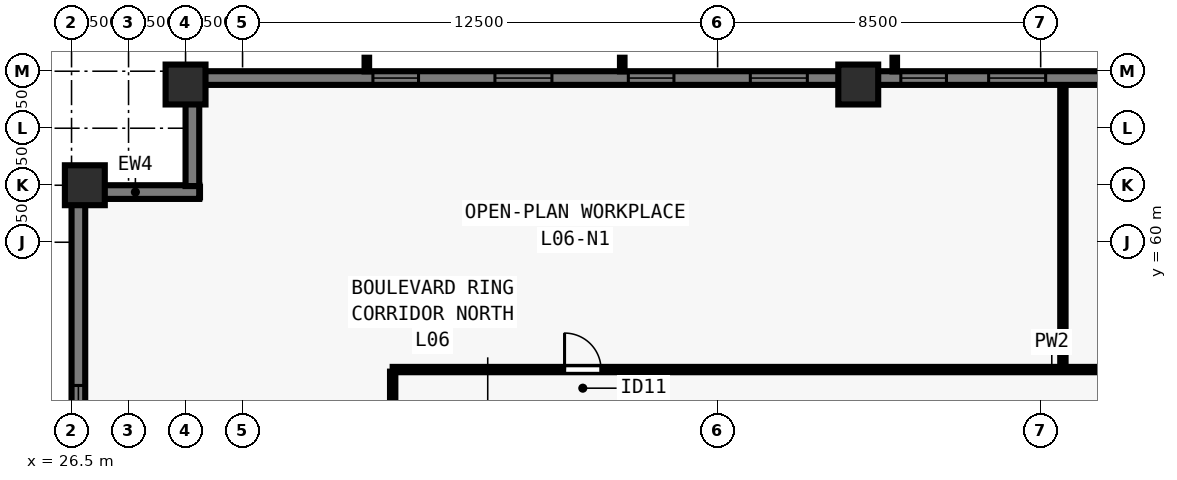
"""IFC4 building model, lengths in metres.
Left out: names, types, materials, properties, quantities, classifications, styles, units other than length and angle.
Written with IfcOpenShell. Run it as: python <this file> out.ifc"""

import sys

from ifc_helpers import new_model, si_unit, direction, frame, frame_2d, origin, origin_2d, place, context, subcontext, project, spatial, rectangle, extrude, element, fill, save


model = new_model("IFC4")
c1 = context("Model", 3, precision=1e-05, world=origin(), true_north=direction((0.0, 1.0)))
c2 = subcontext(c1, "Body", "Model", "MODEL_VIEW")
j1 = project(units=[si_unit("LENGTHUNIT", "METRE"), si_unit("PLANEANGLEUNIT", "RADIAN")], contexts=[c1])
p1 = place(None, origin())
s1 = spatial("IfcSite", under=j1, at=p1, CompositionType="ELEMENT")
p2 = place(p1, origin())
s2 = spatial("IfcBuilding", under=s1, at=p2, CompositionType="ELEMENT")
p3 = place(p2, frame((0.0, 0.0, 27.0)))
s3 = spatial("IfcBuildingStorey", under=s2, at=p3, CompositionType="ELEMENT", Elevation=27.0)
for number, where, z_axis, x_axis in (
    (1, (47.2, 64.15, 0.0), (0.0, 0.0, 1.0), (1.0, 0.0, 0.0)),
    (2, (29.5, 64.15, 0.0), (0.0, 0.0, 1.0), (1.0, 0.0, 0.0)),
    (3, (26.85, 61.5, 0.0), (0.0, 0.0, 1.0), (0.0, 1.0, 0.0)),
):
    element("IfcColumn", number, at=place(p3, frame(where, z_axis=z_axis, x_axis=x_axis)), inside=s3, PredefinedType="COLUMN", context=c2, shape_type="SweptSolid", body=[
        extrude(rectangle(XDim=1.05, YDim=1.05, at=origin_2d()), origin(), (0.0, 0.0, 1.0), 3.5),
    ])
p4 = place(p3, frame((26.68, 16.5, 0.0), z_axis=(0.0, 0.0, 1.0), x_axis=(0.0, 1.0, 0.0)))
e4 = element("IfcWall", 4, at=p4, inside=s3, PredefinedType="SOLIDWALL", context=c2, shape_type="SweptSolid", body=[
    extrude(rectangle(XDim=44.662, YDim=0.36, at=frame_2d((22.331, 0.0))), origin(), (0.0, 0.0, 1.0), 3.28),
])
p5 = place(p4, frame((4.93, 0.0, 0.8)))
e5 = element("IfcOpeningElement", 5, at=p5, cuts=e4, PredefinedType="OPENING", context=c2, shape_type="SweptSolid", body=[
    extrude(rectangle(XDim=1.2, YDim=1.544, at=frame_2d((0.6, 0.772))), frame((0.0, 0.19, 0.0), z_axis=(0.0, -1.0, 0.0), x_axis=(1.0, 0.0, 0.0)), (0.0, 0.0, 1.0), 0.38),
])
p6 = place(p4, frame((8.14, 0.0, 0.8)))
e6 = element("IfcOpeningElement", 6, at=p6, cuts=e4, PredefinedType="OPENING", context=c2, shape_type="SweptSolid", body=[
    extrude(rectangle(XDim=1.5, YDim=1.544, at=frame_2d((0.75, 0.772))), frame((0.0, 0.19, 0.0), z_axis=(0.0, -1.0, 0.0), x_axis=(1.0, 0.0, 0.0)), (0.0, 0.0, 1.0), 0.38),
])
p7 = place(p4, frame((11.65, 0.0, 0.8)))
e7 = element("IfcOpeningElement", 7, at=p7, cuts=e4, PredefinedType="OPENING", context=c2, shape_type="SweptSolid", body=[
    extrude(rectangle(XDim=1.2, YDim=1.544, at=frame_2d((0.6, 0.772))), frame((0.0, 0.19, 0.0), z_axis=(0.0, -1.0, 0.0), x_axis=(1.0, 0.0, 0.0)), (0.0, 0.0, 1.0), 0.38),
])
p8 = place(p4, frame((14.411, 0.0, 0.8)))
e8 = element("IfcOpeningElement", 8, at=p8, cuts=e4, PredefinedType="OPENING", context=c2, shape_type="SweptSolid", body=[
    extrude(rectangle(XDim=1.5, YDim=1.544, at=frame_2d((0.75, 0.772))), frame((0.0, 0.19, 0.0), z_axis=(0.0, -1.0, 0.0), x_axis=(1.0, 0.0, 0.0)), (0.0, 0.0, 1.0), 0.38),
])
p9 = place(p4, frame((18.821, 0.0, 0.8)))
e9 = element("IfcOpeningElement", 9, at=p9, cuts=e4, PredefinedType="OPENING", context=c2, shape_type="SweptSolid", body=[
    extrude(rectangle(XDim=1.2, YDim=1.544, at=frame_2d((0.6, 0.772))), frame((0.0, 0.19, 0.0), z_axis=(0.0, -1.0, 0.0), x_axis=(1.0, 0.0, 0.0)), (0.0, 0.0, 1.0), 0.38),
])
p10 = place(p4, frame((21.581, 0.0, 0.8)))
e10 = element("IfcOpeningElement", 10, at=p10, cuts=e4, PredefinedType="OPENING", context=c2, shape_type="SweptSolid", body=[
    extrude(rectangle(XDim=1.5, YDim=1.544, at=frame_2d((0.75, 0.772))), frame((0.0, 0.19, 0.0), z_axis=(0.0, -1.0, 0.0), x_axis=(1.0, 0.0, 0.0)), (0.0, 0.0, 1.0), 0.38),
])
p11 = place(p4, frame((25.091, 0.0, 0.8)))
e11 = element("IfcOpeningElement", 11, at=p11, cuts=e4, PredefinedType="OPENING", context=c2, shape_type="SweptSolid", body=[
    extrude(rectangle(XDim=1.2, YDim=1.544, at=frame_2d((0.6, 0.772))), frame((0.0, 0.19, 0.0), z_axis=(0.0, -1.0, 0.0), x_axis=(1.0, 0.0, 0.0)), (0.0, 0.0, 1.0), 0.38),
])
p12 = place(p4, frame((29.151, 0.0, 0.8)))
e12 = element("IfcOpeningElement", 12, at=p12, cuts=e4, PredefinedType="OPENING", context=c2, shape_type="SweptSolid", body=[
    extrude(rectangle(XDim=1.5, YDim=1.544, at=frame_2d((0.75, 0.772))), frame((0.0, 0.19, 0.0), z_axis=(0.0, -1.0, 0.0), x_axis=(1.0, 0.0, 0.0)), (0.0, 0.0, 1.0), 0.38),
])
p13 = place(p4, frame((31.812, 0.0, 0.8)))
e13 = element("IfcOpeningElement", 13, at=p13, cuts=e4, PredefinedType="OPENING", context=c2, shape_type="SweptSolid", body=[
    extrude(rectangle(XDim=1.2, YDim=1.544, at=frame_2d((0.6, 0.772))), frame((0.0, 0.19, 0.0), z_axis=(0.0, -1.0, 0.0), x_axis=(1.0, 0.0, 0.0)), (0.0, 0.0, 1.0), 0.38),
])
p14 = place(p4, frame((35.022, 0.0, 0.8)))
e14 = element("IfcOpeningElement", 14, at=p14, cuts=e4, PredefinedType="OPENING", context=c2, shape_type="SweptSolid", body=[
    extrude(rectangle(XDim=1.5, YDim=1.544, at=frame_2d((0.75, 0.772))), frame((0.0, 0.19, 0.0), z_axis=(0.0, -1.0, 0.0), x_axis=(1.0, 0.0, 0.0)), (0.0, 0.0, 1.0), 0.38),
])
p15 = place(p4, frame((38.532, 0.0, 0.8)))
e15 = element("IfcOpeningElement", 15, at=p15, cuts=e4, PredefinedType="OPENING", context=c2, shape_type="SweptSolid", body=[
    extrude(rectangle(XDim=1.2, YDim=1.544, at=frame_2d((0.6, 0.772))), frame((0.0, 0.19, 0.0), z_axis=(0.0, -1.0, 0.0), x_axis=(1.0, 0.0, 0.0)), (0.0, 0.0, 1.0), 0.38),
])
p16 = place(p3, frame((26.5, 61.32, 0.0), z_axis=(0.0, 0.0, 1.0), x_axis=(1.0, 0.0, 0.0)))
e16 = element("IfcWall", 16, at=p16, inside=s3, PredefinedType="SOLIDWALL", context=c2, shape_type="SweptSolid", body=[
    extrude(rectangle(XDim=3.36, YDim=0.36, at=frame_2d((1.68, 0.0))), origin(), (0.0, 0.0, 1.0), 3.28),
])
p17 = place(p3, frame((29.68, 61.478, 0.0), z_axis=(0.0, 0.0, 1.0), x_axis=(0.0, 1.0, 0.0)))
e17 = element("IfcWall", 17, at=p17, inside=s3, PredefinedType="SOLIDWALL", context=c2, shape_type="SweptSolid", body=[
    extrude(rectangle(XDim=2.684, YDim=0.36, at=frame_2d((1.342, 0.0))), origin(), (0.0, 0.0, 1.0), 3.28),
])
p18 = place(p3, frame((29.5, 64.32, 0.0), z_axis=(0.0, 0.0, 1.0), x_axis=(1.0, 0.0, 0.0)))
e18 = element("IfcWall", 18, at=p18, inside=s3, PredefinedType="SOLIDWALL", context=c2, shape_type="SweptSolid", body=[
    extrude(rectangle(XDim=44.662, YDim=0.36, at=frame_2d((22.331, 0.0))), origin(), (0.0, 0.0, 1.0), 3.28),
])
p19 = place(p18, frame((4.93, 0.0, 0.8)))
e19 = element("IfcOpeningElement", 19, at=p19, cuts=e18, PredefinedType="OPENING", context=c2, shape_type="SweptSolid", body=[
    extrude(rectangle(XDim=1.2, YDim=1.544, at=frame_2d((0.6, 0.772))), frame((0.0, 0.19, 0.0), z_axis=(0.0, -1.0, 0.0), x_axis=(1.0, 0.0, 0.0)), (0.0, 0.0, 1.0), 0.38),
])
p20 = place(p18, frame((8.14, 0.0, 0.8)))
e20 = element("IfcOpeningElement", 20, at=p20, cuts=e18, PredefinedType="OPENING", context=c2, shape_type="SweptSolid", body=[
    extrude(rectangle(XDim=1.5, YDim=1.544, at=frame_2d((0.75, 0.772))), frame((0.0, 0.19, 0.0), z_axis=(0.0, -1.0, 0.0), x_axis=(1.0, 0.0, 0.0)), (0.0, 0.0, 1.0), 0.38),
])
p21 = place(p18, frame((11.65, 0.0, 0.8)))
e21 = element("IfcOpeningElement", 21, at=p21, cuts=e18, PredefinedType="OPENING", context=c2, shape_type="SweptSolid", body=[
    extrude(rectangle(XDim=1.2, YDim=1.544, at=frame_2d((0.6, 0.772))), frame((0.0, 0.19, 0.0), z_axis=(0.0, -1.0, 0.0), x_axis=(1.0, 0.0, 0.0)), (0.0, 0.0, 1.0), 0.38),
])
p22 = place(p18, frame((14.861, 0.0, 0.8)))
e22 = element("IfcOpeningElement", 22, at=p22, cuts=e18, PredefinedType="OPENING", context=c2, shape_type="SweptSolid", body=[
    extrude(rectangle(XDim=1.5, YDim=1.544, at=frame_2d((0.75, 0.772))), frame((0.0, 0.19, 0.0), z_axis=(0.0, -1.0, 0.0), x_axis=(1.0, 0.0, 0.0)), (0.0, 0.0, 1.0), 0.38),
])
p23 = place(p18, frame((18.821, 0.0, 0.8)))
e23 = element("IfcOpeningElement", 23, at=p23, cuts=e18, PredefinedType="OPENING", context=c2, shape_type="SweptSolid", body=[
    extrude(rectangle(XDim=1.2, YDim=1.544, at=frame_2d((0.6, 0.772))), frame((0.0, 0.19, 0.0), z_axis=(0.0, -1.0, 0.0), x_axis=(1.0, 0.0, 0.0)), (0.0, 0.0, 1.0), 0.38),
])
p24 = place(p18, frame((21.131, 0.0, 0.8)))
e24 = element("IfcOpeningElement", 24, at=p24, cuts=e18, PredefinedType="OPENING", context=c2, shape_type="SweptSolid", body=[
    extrude(rectangle(XDim=1.5, YDim=1.544, at=frame_2d((0.75, 0.772))), frame((0.0, 0.19, 0.0), z_axis=(0.0, -1.0, 0.0), x_axis=(1.0, 0.0, 0.0)), (0.0, 0.0, 1.0), 0.38),
])
p25 = place(p18, frame((25.091, 0.0, 0.8)))
e25 = element("IfcOpeningElement", 25, at=p25, cuts=e18, PredefinedType="OPENING", context=c2, shape_type="SweptSolid", body=[
    extrude(rectangle(XDim=1.2, YDim=1.544, at=frame_2d((0.6, 0.772))), frame((0.0, 0.19, 0.0), z_axis=(0.0, -1.0, 0.0), x_axis=(1.0, 0.0, 0.0)), (0.0, 0.0, 1.0), 0.38),
])
p26 = place(p18, frame((28.302, 0.0, 0.8)))
e26 = element("IfcOpeningElement", 26, at=p26, cuts=e18, PredefinedType="OPENING", context=c2, shape_type="SweptSolid", body=[
    extrude(rectangle(XDim=1.5, YDim=1.544, at=frame_2d((0.75, 0.772))), frame((0.0, 0.19, 0.0), z_axis=(0.0, -1.0, 0.0), x_axis=(1.0, 0.0, 0.0)), (0.0, 0.0, 1.0), 0.38),
])
p27 = place(p18, frame((31.812, 0.0, 0.8)))
e27 = element("IfcOpeningElement", 27, at=p27, cuts=e18, PredefinedType="OPENING", context=c2, shape_type="SweptSolid", body=[
    extrude(rectangle(XDim=1.2, YDim=1.544, at=frame_2d((0.6, 0.772))), frame((0.0, 0.19, 0.0), z_axis=(0.0, -1.0, 0.0), x_axis=(1.0, 0.0, 0.0)), (0.0, 0.0, 1.0), 0.38),
])
p28 = place(p18, frame((35.022, 0.0, 0.8)))
e28 = element("IfcOpeningElement", 28, at=p28, cuts=e18, PredefinedType="OPENING", context=c2, shape_type="SweptSolid", body=[
    extrude(rectangle(XDim=1.5, YDim=1.544, at=frame_2d((0.75, 0.772))), frame((0.0, 0.19, 0.0), z_axis=(0.0, -1.0, 0.0), x_axis=(1.0, 0.0, 0.0)), (0.0, 0.0, 1.0), 0.38),
])
p29 = place(p18, frame((38.532, 0.0, 0.8)))
e29 = element("IfcOpeningElement", 29, at=p29, cuts=e18, PredefinedType="OPENING", context=c2, shape_type="SweptSolid", body=[
    extrude(rectangle(XDim=1.2, YDim=1.544, at=frame_2d((0.6, 0.772))), frame((0.0, 0.19, 0.0), z_axis=(0.0, -1.0, 0.0), x_axis=(1.0, 0.0, 0.0)), (0.0, 0.0, 1.0), 0.38),
])
p30 = place(p3, frame((34.95, 56.65, 0.0), z_axis=(0.0, 0.0, 1.0), x_axis=(1.0, 0.0, 0.0)))
e30 = element("IfcWall", 30, at=p30, inside=s3, PredefinedType="PARTITIONING", context=c2, shape_type="SweptSolid", body=[
    extrude(rectangle(XDim=34.1, YDim=0.14, at=frame_2d((17.05, 0.0))), origin(), (0.0, 0.0, 1.0), 3.28),
])
p31 = place(p30, frame((4.522, 0.0, 0.0)))
e31 = element("IfcOpeningElement", 31, at=p31, cuts=e30, PredefinedType="OPENING", context=c2, shape_type="SweptSolid", body=[
    extrude(rectangle(XDim=0.96, YDim=2.12, at=frame_2d((0.48, 1.06))), frame((0.0, 0.08, 0.0), z_axis=(0.0, -1.0, 0.0), x_axis=(1.0, 0.0, 0.0)), (0.0, 0.0, 1.0), 0.16),
])
p32 = place(p30, frame((29.202, 0.0, 0.0)))
e32 = element("IfcOpeningElement", 32, at=p32, cuts=e30, PredefinedType="OPENING", context=c2, shape_type="SweptSolid", body=[
    extrude(rectangle(XDim=0.96, YDim=2.12, at=frame_2d((0.48, 1.06))), frame((0.0, 0.08, 0.0), z_axis=(0.0, -1.0, 0.0), x_axis=(1.0, 0.0, 0.0)), (0.0, 0.0, 1.0), 0.16),
])
p33 = place(p3, frame((34.95, 21.405, 0.0), z_axis=(0.0, 0.0, 1.0), x_axis=(0.0, 1.0, 0.0)))
e33 = element("IfcWall", 33, at=p33, inside=s3, PredefinedType="PARTITIONING", context=c2, shape_type="SweptSolid", body=[
    extrude(rectangle(XDim=35.19, YDim=0.14, at=frame_2d((17.595, 0.0))), origin(), (0.0, 0.0, 1.0), 3.28),
])
p34 = place(p33, frame((5.21, 0.0, 0.0)))
e34 = element("IfcOpeningElement", 34, at=p34, cuts=e33, PredefinedType="OPENING", context=c2, shape_type="SweptSolid", body=[
    extrude(rectangle(XDim=0.96, YDim=2.12, at=frame_2d((0.48, 1.06))), frame((0.0, 0.08, 0.0), z_axis=(0.0, -1.0, 0.0), x_axis=(1.0, 0.0, 0.0)), (0.0, 0.0, 1.0), 0.16),
])
p35 = place(p33, frame((17.052, 0.0, 0.0)))
e35 = element("IfcOpeningElement", 35, at=p35, cuts=e33, PredefinedType="OPENING", context=c2, shape_type="SweptSolid", body=[
    extrude(rectangle(XDim=0.96, YDim=2.12, at=frame_2d((0.48, 1.06))), frame((0.0, 0.08, 0.0), z_axis=(0.0, -1.0, 0.0), x_axis=(1.0, 0.0, 0.0)), (0.0, 0.0, 1.0), 0.16),
])
p36 = place(p33, frame((28.957, 0.0, 0.0)))
e36 = element("IfcOpeningElement", 36, at=p36, cuts=e33, PredefinedType="OPENING", context=c2, shape_type="SweptSolid", body=[
    extrude(rectangle(XDim=0.96, YDim=2.12, at=frame_2d((0.48, 1.06))), frame((0.0, 0.08, 0.0), z_axis=(0.0, -1.0, 0.0), x_axis=(1.0, 0.0, 0.0)), (0.0, 0.0, 1.0), 0.16),
])
p37 = place(p3, frame((52.585, 56.75, 0.0), z_axis=(0.0, 0.0, 1.0), x_axis=(0.0, 1.0, 0.0)))
e37 = element("IfcWall", 37, at=p37, inside=s3, PredefinedType="PARTITIONING", context=c2, shape_type="SweptSolid", body=[
    extrude(rectangle(XDim=7.33, YDim=0.14, at=frame_2d((3.665, 0.0))), origin(), (0.0, 0.0, 1.0), 2.849),
])
p38 = place(p15, origin())
e38 = element("IfcWindow", 38, at=p38, inside=s3, PartitioningType="SINGLE_PANEL", PredefinedType="WINDOW", context=c2, shape_type="SweptSolid", body=[
    extrude(rectangle(XDim=1.2, YDim=1.544, at=frame_2d((0.6, 0.772))), frame((0.0, -0.05, 0.0), z_axis=(0.0, -1.0, 0.0), x_axis=(1.0, 0.0, 0.0)), (0.0, 0.0, 1.0), 0.06),
])
fill(e15, e38)
p39 = place(p19, origin())
e39 = element("IfcWindow", 39, at=p39, inside=s3, PartitioningType="SINGLE_PANEL", PredefinedType="WINDOW", context=c2, shape_type="SweptSolid", body=[
    extrude(rectangle(XDim=1.2, YDim=1.544, at=frame_2d((0.6, 0.772))), frame((0.0, -0.05, 0.0), z_axis=(0.0, -1.0, 0.0), x_axis=(1.0, 0.0, 0.0)), (0.0, 0.0, 1.0), 0.06),
])
fill(e19, e39)
p40 = place(p20, origin())
e40 = element("IfcWindow", 40, at=p40, inside=s3, PartitioningType="SINGLE_PANEL", PredefinedType="WINDOW", context=c2, shape_type="SweptSolid", body=[
    extrude(rectangle(XDim=1.5, YDim=1.544, at=frame_2d((0.75, 0.772))), frame((0.0, -0.05, 0.0), z_axis=(0.0, -1.0, 0.0), x_axis=(1.0, 0.0, 0.0)), (0.0, 0.0, 1.0), 0.06),
])
fill(e20, e40)
p41 = place(p21, origin())
e41 = element("IfcWindow", 41, at=p41, inside=s3, PartitioningType="SINGLE_PANEL", PredefinedType="WINDOW", context=c2, shape_type="SweptSolid", body=[
    extrude(rectangle(XDim=1.2, YDim=1.544, at=frame_2d((0.6, 0.772))), frame((0.0, -0.05, 0.0), z_axis=(0.0, -1.0, 0.0), x_axis=(1.0, 0.0, 0.0)), (0.0, 0.0, 1.0), 0.06),
])
fill(e21, e41)
p42 = place(p22, origin())
e42 = element("IfcWindow", 42, at=p42, inside=s3, PartitioningType="SINGLE_PANEL", PredefinedType="WINDOW", context=c2, shape_type="SweptSolid", body=[
    extrude(rectangle(XDim=1.5, YDim=1.544, at=frame_2d((0.75, 0.772))), frame((0.0, -0.05, 0.0), z_axis=(0.0, -1.0, 0.0), x_axis=(1.0, 0.0, 0.0)), (0.0, 0.0, 1.0), 0.06),
])
fill(e22, e42)
p43 = place(p23, origin())
e43 = element("IfcWindow", 43, at=p43, inside=s3, PartitioningType="SINGLE_PANEL", PredefinedType="WINDOW", context=c2, shape_type="SweptSolid", body=[
    extrude(rectangle(XDim=1.2, YDim=1.544, at=frame_2d((0.6, 0.772))), frame((0.0, -0.05, 0.0), z_axis=(0.0, -1.0, 0.0), x_axis=(1.0, 0.0, 0.0)), (0.0, 0.0, 1.0), 0.06),
])
fill(e23, e43)
p44 = place(p24, origin())
e44 = element("IfcWindow", 44, at=p44, inside=s3, PartitioningType="SINGLE_PANEL", PredefinedType="WINDOW", context=c2, shape_type="SweptSolid", body=[
    extrude(rectangle(XDim=1.5, YDim=1.544, at=frame_2d((0.75, 0.772))), frame((0.0, -0.05, 0.0), z_axis=(0.0, -1.0, 0.0), x_axis=(1.0, 0.0, 0.0)), (0.0, 0.0, 1.0), 0.06),
])
fill(e24, e44)
p45 = place(p31, origin())
e45 = element("IfcDoor", 45, at=p45, inside=s3, OperationType="SINGLE_SWING_LEFT", PredefinedType="DOOR", context=c2, shape_type="SweptSolid", body=[
    extrude(rectangle(XDim=0.96, YDim=2.12, at=frame_2d((0.48, 1.06))), frame((0.0, 0.025, 0.0), z_axis=(0.0, -1.0, 0.0), x_axis=(1.0, 0.0, 0.0)), (0.0, 0.0, 1.0), 0.05),
])
fill(e31, e45)
save(model, sys.argv[1])
